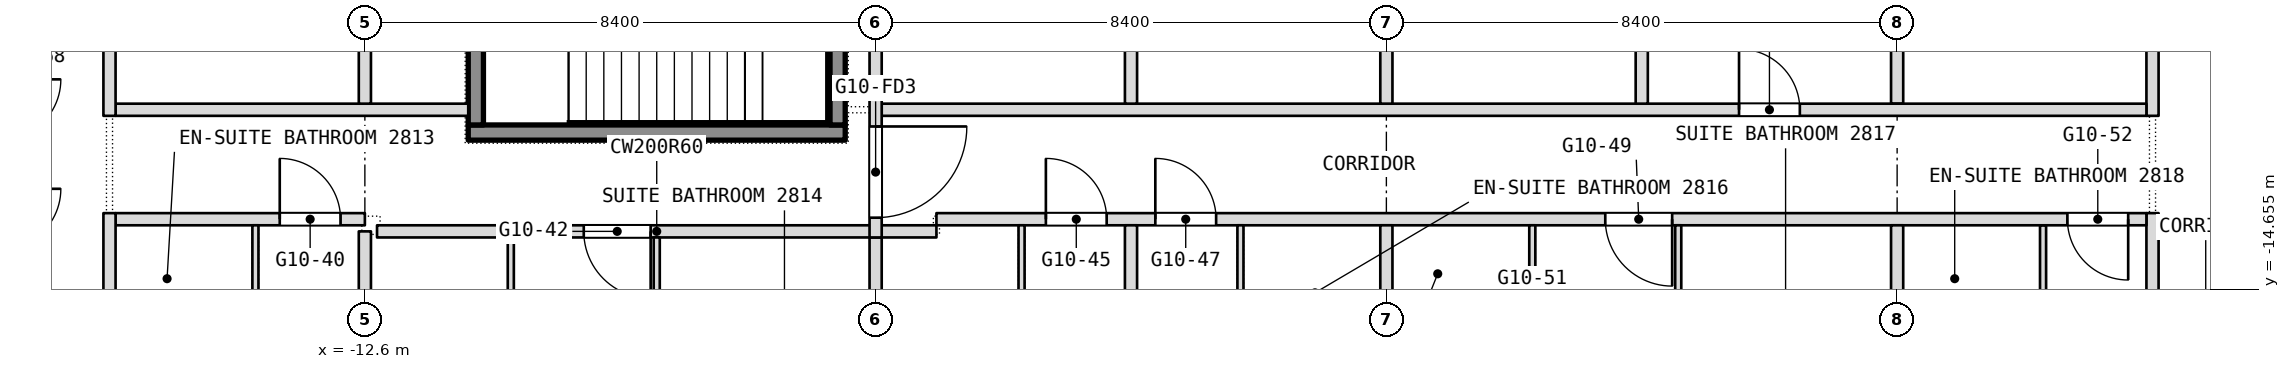
"""IFC4 building model, lengths in metres.
Left out: names, types, materials, properties, quantities, classifications, styles, units other than length and angle.
Written with IfcOpenShell. Run it as: python <this file> out.ifc"""

import sys

from ifc_helpers import new_model, si_unit, direction, frame, frame_2d, origin, place, context, subcontext, project, spatial, rectangle, extrude, element, fill, save


model = new_model("IFC4")
c1 = context("Model", 3, precision=1e-05, world=origin(), true_north=direction((0.0, 1.0)))
c2 = subcontext(c1, "Body", "Model", "MODEL_VIEW")
j1 = project(units=[si_unit("LENGTHUNIT", "METRE"), si_unit("PLANEANGLEUNIT", "RADIAN")], contexts=[c1])
p1 = place(None, origin())
s1 = spatial("IfcSite", under=j1, at=p1, CompositionType="ELEMENT")
p2 = place(p1, origin())
s2 = spatial("IfcBuilding", under=s1, at=p2, CompositionType="ELEMENT")
p3 = place(p2, frame((0.0, 0.0, 126.5)))
s3 = spatial("IfcBuildingStorey", under=s2, at=p3, CompositionType="ELEMENT", Elevation=126.5)
p4 = place(p3, frame((16.8, -22.186, 0.0), z_axis=(0.0, 0.0, 1.0), x_axis=(0.0, 1.0, 0.0)))
e1 = element("IfcWall", 1, at=p4, inside=s3, PredefinedType="PARTITIONING", context=c2, shape_type="SweptSolid", body=[
    extrude(rectangle(XDim=8.786, YDim=0.2, at=frame_2d((4.393, 0.0))), origin(), (0.0, 0.0, 1.0), 3.34),
])
p5 = place(p3, frame((16.8, -11.8, 0.0), z_axis=(0.0, 0.0, 1.0), x_axis=(0.0, 1.0, 0.0)))
e2 = element("IfcWall", 2, at=p5, inside=s3, PredefinedType="PARTITIONING", context=c2, shape_type="SweptSolid", body=[
    extrude(rectangle(XDim=9.9, YDim=0.2, at=frame_2d((4.95, 0.0))), origin(), (0.0, 0.0, 1.0), 3.34),
])
p6 = place(p3, frame((15.0, -16.25, 0.0), z_axis=(0.0, 0.0, 1.0), x_axis=(0.0, 1.0, 0.0)))
e3 = element("IfcWall", 3, at=p6, inside=s3, PredefinedType="PARTITIONING", context=c2, shape_type="SweptSolid", body=[
    extrude(rectangle(XDim=2.65, YDim=0.1, at=frame_2d((1.325, 0.0))), origin(), (0.0, 0.0, 1.0), 3.34),
])
p7 = place(p3, frame((-12.4, -13.7, 0.0), z_axis=(0.0, 0.0, 1.0), x_axis=(1.0, 0.0, 0.0)))
e4 = element("IfcWall", 4, at=p7, inside=s3, PredefinedType="PARTITIONING", context=c2, shape_type="SweptSolid", body=[
    extrude(rectangle(XDim=9.2, YDim=0.2, at=frame_2d((4.6, 0.0))), origin(), (0.0, 0.0, 1.0), 3.34),
])
p8 = place(p7, frame((3.4, 0.0, 0.0)))
e5 = element("IfcOpeningElement", 5, at=p8, cuts=e4, PredefinedType="OPENING", context=c2, shape_type="SweptSolid", body=[
    extrude(rectangle(XDim=1.1, YDim=2.1, at=frame_2d((0.55, 1.05))), frame((0.0, 0.1, 0.0), z_axis=(0.0, -1.0, 0.0), x_axis=(1.0, 0.0, 0.0)), (0.0, 0.0, 1.0), 0.2),
])
p9 = place(p3, frame((-16.7, -13.5, 0.0), z_axis=(0.0, 0.0, 1.0), x_axis=(1.0, 0.0, 0.0)))
e6 = element("IfcWall", 6, at=p9, inside=s3, PredefinedType="PARTITIONING", context=c2, shape_type="SweptSolid", body=[
    extrude(rectangle(XDim=4.1, YDim=0.2, at=frame_2d((2.05, 0.0))), origin(), (0.0, 0.0, 1.0), 3.34),
])
p10 = place(p9, frame((2.7, 0.0, 0.0)))
e7 = element("IfcOpeningElement", 7, at=p10, cuts=e6, PredefinedType="OPENING", context=c2, shape_type="SweptSolid", body=[
    extrude(rectangle(XDim=1.0, YDim=2.1, at=frame_2d((0.5, 1.05))), frame((0.0, 0.1, 0.0), z_axis=(0.0, -1.0, 0.0), x_axis=(1.0, 0.0, 0.0)), (0.0, 0.0, 1.0), 0.2),
])
p11 = place(p3, frame((-3.2, -13.5, 0.0), z_axis=(0.0, 0.0, 1.0), x_axis=(1.0, 0.0, 0.0)))
e8 = element("IfcWall", 8, at=p11, inside=s3, PredefinedType="PARTITIONING", context=c2, shape_type="SweptSolid", body=[
    extrude(rectangle(XDim=19.9, YDim=0.2, at=frame_2d((9.95, 0.0))), origin(), (0.0, 0.0, 1.0), 3.34),
])
p12 = place(p11, frame((1.8, 0.0, 0.0)))
e9 = element("IfcOpeningElement", 9, at=p12, cuts=e8, PredefinedType="OPENING", context=c2, shape_type="SweptSolid", body=[
    extrude(rectangle(XDim=1.0, YDim=2.1, at=frame_2d((0.5, 1.05))), frame((0.0, 0.1, 0.0), z_axis=(0.0, -1.0, 0.0), x_axis=(1.0, 0.0, 0.0)), (0.0, 0.0, 1.0), 0.2),
])
p13 = place(p11, frame((3.6, 0.0, 0.0)))
e10 = element("IfcOpeningElement", 10, at=p13, cuts=e8, PredefinedType="OPENING", context=c2, shape_type="SweptSolid", body=[
    extrude(rectangle(XDim=1.0, YDim=2.1, at=frame_2d((0.5, 1.05))), frame((0.0, 0.1, 0.0), z_axis=(0.0, -1.0, 0.0), x_axis=(1.0, 0.0, 0.0)), (0.0, 0.0, 1.0), 0.2),
])
p14 = place(p11, frame((11.0, 0.0, 0.0)))
e11 = element("IfcOpeningElement", 11, at=p14, cuts=e8, PredefinedType="OPENING", context=c2, shape_type="SweptSolid", body=[
    extrude(rectangle(XDim=1.1, YDim=2.1, at=frame_2d((0.55, 1.05))), frame((0.0, 0.1, 0.0), z_axis=(0.0, -1.0, 0.0), x_axis=(1.0, 0.0, 0.0)), (0.0, 0.0, 1.0), 0.2),
])
p15 = place(p11, frame((18.6, 0.0, 0.0)))
e12 = element("IfcOpeningElement", 12, at=p15, cuts=e8, PredefinedType="OPENING", context=c2, shape_type="SweptSolid", body=[
    extrude(rectangle(XDim=1.0, YDim=2.1, at=frame_2d((0.5, 1.05))), frame((0.0, 0.1, 0.0), z_axis=(0.0, -1.0, 0.0), x_axis=(1.0, 0.0, 0.0)), (0.0, 0.0, 1.0), 0.2),
])
p16 = place(p3, frame((12.6, -21.175, 0.0), z_axis=(0.0, 0.0, 1.0), x_axis=(0.0, 1.0, 0.0)))
e13 = element("IfcWall", 13, at=p16, inside=s3, PredefinedType="PARTITIONING", context=c2, shape_type="SweptSolid", body=[
    extrude(rectangle(XDim=7.575, YDim=0.2, at=frame_2d((3.788, 0.0))), origin(), (0.0, 0.0, 1.0), 3.34),
])
p17 = place(p3, frame((12.6, -11.6, 0.0), z_axis=(0.0, 0.0, 1.0), x_axis=(0.0, 1.0, 0.0)))
e14 = element("IfcWall", 14, at=p17, inside=s3, PredefinedType="PARTITIONING", context=c2, shape_type="SweptSolid", body=[
    extrude(rectangle(XDim=3.9, YDim=0.2, at=frame_2d((1.95, 0.0))), origin(), (0.0, 0.0, 1.0), 3.34),
])
p18 = place(p3, frame((-16.7, -11.7, 0.0), z_axis=(0.0, 0.0, 1.0), x_axis=(1.0, 0.0, 0.0)))
e15 = element("IfcWall", 15, at=p18, inside=s3, PredefinedType="PARTITIONING", context=c2, shape_type="SweptSolid", body=[
    extrude(rectangle(XDim=5.8, YDim=0.2, at=frame_2d((2.9, 0.0))), origin(), (0.0, 0.0, 1.0), 3.34),
])
p19 = place(p3, frame((-4.1, -11.7, 0.0), z_axis=(0.0, 0.0, 1.0), x_axis=(1.0, 0.0, 0.0)))
e16 = element("IfcWall", 16, at=p19, inside=s3, PredefinedType="PARTITIONING", context=c2, shape_type="SweptSolid", body=[
    extrude(rectangle(XDim=20.8, YDim=0.2, at=frame_2d((10.4, 0.0))), origin(), (0.0, 0.0, 1.0), 3.34),
])
p20 = place(p19, frame((14.1, 0.0, 0.0)))
e17 = element("IfcOpeningElement", 17, at=p20, cuts=e16, PredefinedType="OPENING", context=c2, shape_type="SweptSolid", body=[
    extrude(rectangle(XDim=1.0, YDim=2.1, at=frame_2d((0.5, 1.05))), frame((0.0, 0.1, 0.0), z_axis=(0.0, -1.0, 0.0), x_axis=(1.0, 0.0, 0.0)), (0.0, 0.0, 1.0), 0.2),
])
p21 = place(p3, frame((9.0, -18.05, 0.0), z_axis=(0.0, 0.0, 1.0), x_axis=(0.0, 1.0, 0.0)))
e18 = element("IfcWall", 18, at=p21, inside=s3, PredefinedType="PARTITIONING", context=c2, shape_type="SweptSolid", body=[
    extrude(rectangle(XDim=4.45, YDim=0.1, at=frame_2d((2.225, 0.0))), origin(), (0.0, 0.0, 1.0), 3.34),
])
p22 = place(p3, frame((8.4, -11.6, 0.0), z_axis=(0.0, 0.0, 1.0), x_axis=(0.0, 1.0, 0.0)))
e19 = element("IfcWall", 19, at=p22, inside=s3, PredefinedType="PARTITIONING", context=c2, shape_type="SweptSolid", body=[
    extrude(rectangle(XDim=3.8, YDim=0.2, at=frame_2d((1.9, 0.0))), origin(), (0.0, 0.0, 1.0), 3.34),
])
p23 = place(p3, frame((6.6, -17.05, 0.0), z_axis=(0.0, 0.0, 1.0), x_axis=(0.0, 1.0, 0.0)))
e20 = element("IfcWall", 20, at=p23, inside=s3, PredefinedType="PARTITIONING", context=c2, shape_type="SweptSolid", body=[
    extrude(rectangle(XDim=3.45, YDim=0.1, at=frame_2d((1.725, 0.0))), origin(), (0.0, 0.0, 1.0), 3.34),
])
p24 = place(p23, frame((1.12, 0.0, 0.0)))
e21 = element("IfcOpeningElement", 21, at=p24, cuts=e20, PredefinedType="OPENING", context=c2, shape_type="SweptSolid", body=[
    extrude(rectangle(XDim=0.9, YDim=2.1, at=frame_2d((0.45, 1.05))), frame((0.0, 0.05, 0.0), z_axis=(0.0, -1.0, 0.0), x_axis=(1.0, 0.0, 0.0)), (0.0, 0.0, 1.0), 0.1),
])
p25 = place(p3, frame((4.2, -23.3, 0.0), z_axis=(0.0, 0.0, 1.0), x_axis=(0.0, 1.0, 0.0)))
e22 = element("IfcWall", 22, at=p25, inside=s3, PredefinedType="PARTITIONING", context=c2, shape_type="SweptSolid", body=[
    extrude(rectangle(XDim=9.7, YDim=0.2, at=frame_2d((4.85, 0.0))), origin(), (0.0, 0.0, 1.0), 3.34),
])
p26 = place(p3, frame((4.2, -11.6, 0.0), z_axis=(0.0, 0.0, 1.0), x_axis=(0.0, 1.0, 0.0)))
e23 = element("IfcWall", 23, at=p26, inside=s3, PredefinedType="PARTITIONING", context=c2, shape_type="SweptSolid", body=[
    extrude(rectangle(XDim=9.7, YDim=0.2, at=frame_2d((4.85, 0.0))), origin(), (0.0, 0.0, 1.0), 3.34),
])
p27 = place(p3, frame((1.8, -16.95, 0.0), z_axis=(0.0, 0.0, 1.0), x_axis=(0.0, 1.0, 0.0)))
e24 = element("IfcWall", 24, at=p27, inside=s3, PredefinedType="PARTITIONING", context=c2, shape_type="SweptSolid", body=[
    extrude(rectangle(XDim=3.35, YDim=0.1, at=frame_2d((1.675, 0.0))), origin(), (0.0, 0.0, 1.0), 3.34),
])
p28 = place(p3, frame((0.0, -23.3, 0.0), z_axis=(0.0, 0.0, 1.0), x_axis=(0.0, 1.0, 0.0)))
e25 = element("IfcWall", 25, at=p28, inside=s3, PredefinedType="PARTITIONING", context=c2, shape_type="SweptSolid", body=[
    extrude(rectangle(XDim=9.7, YDim=0.2, at=frame_2d((4.85, 0.0))), origin(), (0.0, 0.0, 1.0), 3.34),
])
p29 = place(p3, frame((0.0, -11.6, 0.0), z_axis=(0.0, 0.0, 1.0), x_axis=(0.0, 1.0, 0.0)))
e26 = element("IfcWall", 26, at=p29, inside=s3, PredefinedType="PARTITIONING", context=c2, shape_type="SweptSolid", body=[
    extrude(rectangle(XDim=9.7, YDim=0.2, at=frame_2d((4.85, 0.0))), origin(), (0.0, 0.0, 1.0), 3.34),
])
p30 = place(p3, frame((-1.8, -16.85, 0.0), z_axis=(0.0, 0.0, 1.0), x_axis=(0.0, 1.0, 0.0)))
e27 = element("IfcWall", 27, at=p30, inside=s3, PredefinedType="PARTITIONING", context=c2, shape_type="SweptSolid", body=[
    extrude(rectangle(XDim=3.25, YDim=0.1, at=frame_2d((1.625, 0.0))), origin(), (0.0, 0.0, 1.0), 3.34),
])
p31 = place(p3, frame((-4.2, -23.3, 0.0), z_axis=(0.0, 0.0, 1.0), x_axis=(0.0, 1.0, 0.0)))
e28 = element("IfcWall", 28, at=p31, inside=s3, PredefinedType="PARTITIONING", context=c2, shape_type="SweptSolid", body=[
    extrude(rectangle(XDim=9.5, YDim=0.2, at=frame_2d((4.75, 0.0))), origin(), (0.0, 0.0, 1.0), 3.34),
])
p32 = place(p3, frame((-4.2, -13.8, 0.0), z_axis=(0.0, 0.0, 1.0), x_axis=(0.0, 1.0, 0.0)))
e29 = element("IfcWall", 29, at=p32, inside=s3, PredefinedType="PARTITIONING", context=c2, shape_type="SweptSolid", body=[
    extrude(rectangle(XDim=13.8, YDim=0.2, at=frame_2d((6.9, 0.0))), origin(), (0.0, 0.0, 1.0), 3.34),
])
p33 = place(p32, frame((12.15, 0.0, 0.0)))
e30 = element("IfcOpeningElement", 30, at=p33, cuts=e29, PredefinedType="OPENING", context=c2, shape_type="SweptSolid", body=[
    extrude(rectangle(XDim=1.5, YDim=2.1, at=frame_2d((0.75, 1.05))), frame((0.0, 0.1, 0.0), z_axis=(0.0, -1.0, 0.0), x_axis=(1.0, 0.0, 0.0)), (0.0, 0.0, 1.0), 0.2),
])
p34 = place(p32, frame((0.325, 0.0, 0.0)))
e31 = element("IfcOpeningElement", 31, at=p34, cuts=e29, PredefinedType="OPENING", context=c2, shape_type="SweptSolid", body=[
    extrude(rectangle(XDim=1.5, YDim=2.1, at=frame_2d((0.75, 1.05))), frame((0.0, 0.1, 0.0), z_axis=(0.0, -1.0, 0.0), x_axis=(1.0, 0.0, 0.0)), (0.0, 0.0, 1.0), 0.2),
])
p35 = place(p3, frame((-7.8, -17.35, 0.0), z_axis=(0.0, 0.0, 1.0), x_axis=(0.0, 1.0, 0.0)))
e32 = element("IfcWall", 32, at=p35, inside=s3, PredefinedType="PARTITIONING", context=c2, shape_type="SweptSolid", body=[
    extrude(rectangle(XDim=3.55, YDim=0.1, at=frame_2d((1.775, 0.0))), origin(), (0.0, 0.0, 1.0), 3.34),
])
p36 = place(p3, frame((-10.2, -17.25, 0.0), z_axis=(0.0, 0.0, 1.0), x_axis=(0.0, 1.0, 0.0)))
e33 = element("IfcWall", 33, at=p36, inside=s3, PredefinedType="PARTITIONING", context=c2, shape_type="SweptSolid", body=[
    extrude(rectangle(XDim=3.45, YDim=0.1, at=frame_2d((1.725, 0.0))), origin(), (0.0, 0.0, 1.0), 3.34),
])
p37 = place(p3, frame((-12.6, -21.175, 0.0), z_axis=(0.0, 0.0, 1.0), x_axis=(0.0, 1.0, 0.0)))
e34 = element("IfcWall", 34, at=p37, inside=s3, PredefinedType="PARTITIONING", context=c2, shape_type="SweptSolid", body=[
    extrude(rectangle(XDim=7.475, YDim=0.2, at=frame_2d((3.738, 0.0))), origin(), (0.0, 0.0, 1.0), 3.34),
])
p38 = place(p3, frame((-12.6, -11.6, 0.0), z_axis=(0.0, 0.0, 1.0), x_axis=(0.0, 1.0, 0.0)))
e35 = element("IfcWall", 35, at=p38, inside=s3, PredefinedType="PARTITIONING", context=c2, shape_type="SweptSolid", body=[
    extrude(rectangle(XDim=9.7, YDim=0.2, at=frame_2d((4.85, 0.0))), origin(), (0.0, 0.0, 1.0), 3.34),
])
p39 = place(p3, frame((-14.4, -16.25, 0.0), z_axis=(0.0, 0.0, 1.0), x_axis=(0.0, 1.0, 0.0)))
e36 = element("IfcWall", 36, at=p39, inside=s3, PredefinedType="PARTITIONING", context=c2, shape_type="SweptSolid", body=[
    extrude(rectangle(XDim=2.65, YDim=0.1, at=frame_2d((1.325, 0.0))), origin(), (0.0, 0.0, 1.0), 3.34),
])
p40 = place(p3, frame((-16.8, -22.186, 0.0), z_axis=(0.0, 0.0, 1.0), x_axis=(0.0, 1.0, 0.0)))
e37 = element("IfcWall", 37, at=p40, inside=s3, PredefinedType="PARTITIONING", context=c2, shape_type="SweptSolid", body=[
    extrude(rectangle(XDim=8.786, YDim=0.2, at=frame_2d((4.393, 0.0))), origin(), (0.0, 0.0, 1.0), 3.34),
])
p41 = place(p3, frame((-16.8, -11.8, 0.0), z_axis=(0.0, 0.0, 1.0), x_axis=(0.0, 1.0, 0.0)))
e38 = element("IfcWall", 38, at=p41, inside=s3, PredefinedType="PARTITIONING", context=c2, shape_type="SweptSolid", body=[
    extrude(rectangle(XDim=9.9, YDim=0.2, at=frame_2d((4.95, 0.0))), origin(), (0.0, 0.0, 1.0), 3.34),
])
p42 = place(p3, frame((-10.9, -12.075, 0.1), z_axis=(0.0, 0.0, 1.0), x_axis=(1.0, 0.0, 0.0)))
e39 = element("IfcWall", 39, at=p42, inside=s3, PredefinedType="SHEAR", context=c2, shape_type="SweptSolid", body=[
    extrude(rectangle(XDim=6.2, YDim=0.25, at=frame_2d((3.1, 0.0))), origin(), (0.0, 0.0, 1.0), 3.6),
])
for number, where, z_axis, x_axis in (
    (40, (-10.775, -11.95, 0.1), (0.0, 0.0, 1.0), (0.0, 1.0, 0.0)),
    (41, (-4.825, -11.95, 0.1), (0.0, 0.0, 1.0), (0.0, 1.0, 0.0)),
):
    element("IfcWall", number, at=place(p3, frame(where, z_axis=z_axis, x_axis=x_axis)), inside=s3, PredefinedType="SHEAR", context=c2, shape_type="SweptSolid", body=[
        extrude(rectangle(XDim=2.9, YDim=0.25, at=frame_2d((1.45, 0.0))), origin(), (0.0, 0.0, 1.0), 3.6),
    ])
p43 = place(p8, origin())
e42 = element("IfcDoor", 42, at=p43, inside=s3, OperationType="SINGLE_SWING_LEFT", PredefinedType="DOOR", context=c2, shape_type="SweptSolid", body=[
    extrude(rectangle(XDim=1.1, YDim=2.1, at=frame_2d((0.55, 1.05))), frame((0.0, 0.025, 0.0), z_axis=(0.0, -1.0, 0.0), x_axis=(1.0, 0.0, 0.0)), (0.0, 0.0, 1.0), 0.05),
])
fill(e5, e42)
p44 = place(p10, origin())
e43 = element("IfcDoor", 43, at=p44, inside=s3, OperationType="SINGLE_SWING_RIGHT", PredefinedType="DOOR", context=c2, shape_type="SweptSolid", body=[
    extrude(rectangle(XDim=1.0, YDim=2.1, at=frame_2d((0.5, 1.05))), frame((0.0, 0.025, 0.0), z_axis=(0.0, -1.0, 0.0), x_axis=(1.0, 0.0, 0.0)), (0.0, 0.0, 1.0), 0.05),
])
fill(e7, e43)
p45 = place(p12, origin())
e44 = element("IfcDoor", 44, at=p45, inside=s3, OperationType="SINGLE_SWING_LEFT", PredefinedType="DOOR", context=c2, shape_type="SweptSolid", body=[
    extrude(rectangle(XDim=1.0, YDim=2.1, at=frame_2d((0.5, 1.05))), frame((0.0, 0.025, 0.0), z_axis=(0.0, -1.0, 0.0), x_axis=(1.0, 0.0, 0.0)), (0.0, 0.0, 1.0), 0.05),
])
fill(e9, e44)
p46 = place(p13, origin())
e45 = element("IfcDoor", 45, at=p46, inside=s3, OperationType="SINGLE_SWING_LEFT", PredefinedType="DOOR", context=c2, shape_type="SweptSolid", body=[
    extrude(rectangle(XDim=1.0, YDim=2.1, at=frame_2d((0.5, 1.05))), frame((0.0, 0.025, 0.0), z_axis=(0.0, -1.0, 0.0), x_axis=(1.0, 0.0, 0.0)), (0.0, 0.0, 1.0), 0.05),
])
fill(e10, e45)
p47 = place(p14, origin())
e46 = element("IfcDoor", 46, at=p47, inside=s3, OperationType="SINGLE_SWING_LEFT", PredefinedType="DOOR", context=c2, shape_type="SweptSolid", body=[
    extrude(rectangle(XDim=1.1, YDim=2.1, at=frame_2d((0.55, 1.05))), frame((0.0, 0.025, 0.0), z_axis=(0.0, -1.0, 0.0), x_axis=(1.0, 0.0, 0.0)), (0.0, 0.0, 1.0), 0.05),
])
fill(e11, e46)
p48 = place(p15, origin())
e47 = element("IfcDoor", 47, at=p48, inside=s3, OperationType="SINGLE_SWING_LEFT", PredefinedType="DOOR", context=c2, shape_type="SweptSolid", body=[
    extrude(rectangle(XDim=1.0, YDim=2.1, at=frame_2d((0.5, 1.05))), frame((0.0, 0.025, 0.0), z_axis=(0.0, -1.0, 0.0), x_axis=(1.0, 0.0, 0.0)), (0.0, 0.0, 1.0), 0.05),
])
fill(e12, e47)
p49 = place(p20, origin())
e48 = element("IfcDoor", 48, at=p49, inside=s3, OperationType="SINGLE_SWING_LEFT", PredefinedType="DOOR", context=c2, shape_type="SweptSolid", body=[
    extrude(rectangle(XDim=1.0, YDim=2.1, at=frame_2d((0.5, 1.05))), frame((0.0, 0.025, 0.0), z_axis=(0.0, -1.0, 0.0), x_axis=(1.0, 0.0, 0.0)), (0.0, 0.0, 1.0), 0.05),
])
fill(e17, e48)
p50 = place(p34, origin())
e49 = element("IfcDoor", 49, at=p50, inside=s3, OperationType="DOUBLE_DOOR_DOUBLE_SWING", PredefinedType="DOOR", context=c2, shape_type="SweptSolid", body=[
    extrude(rectangle(XDim=1.5, YDim=2.1, at=frame_2d((0.75, 1.05))), frame((0.0, 0.025, 0.0), z_axis=(0.0, -1.0, 0.0), x_axis=(1.0, 0.0, 0.0)), (0.0, 0.0, 1.0), 0.05),
])
fill(e31, e49)
save(model, sys.argv[1])
